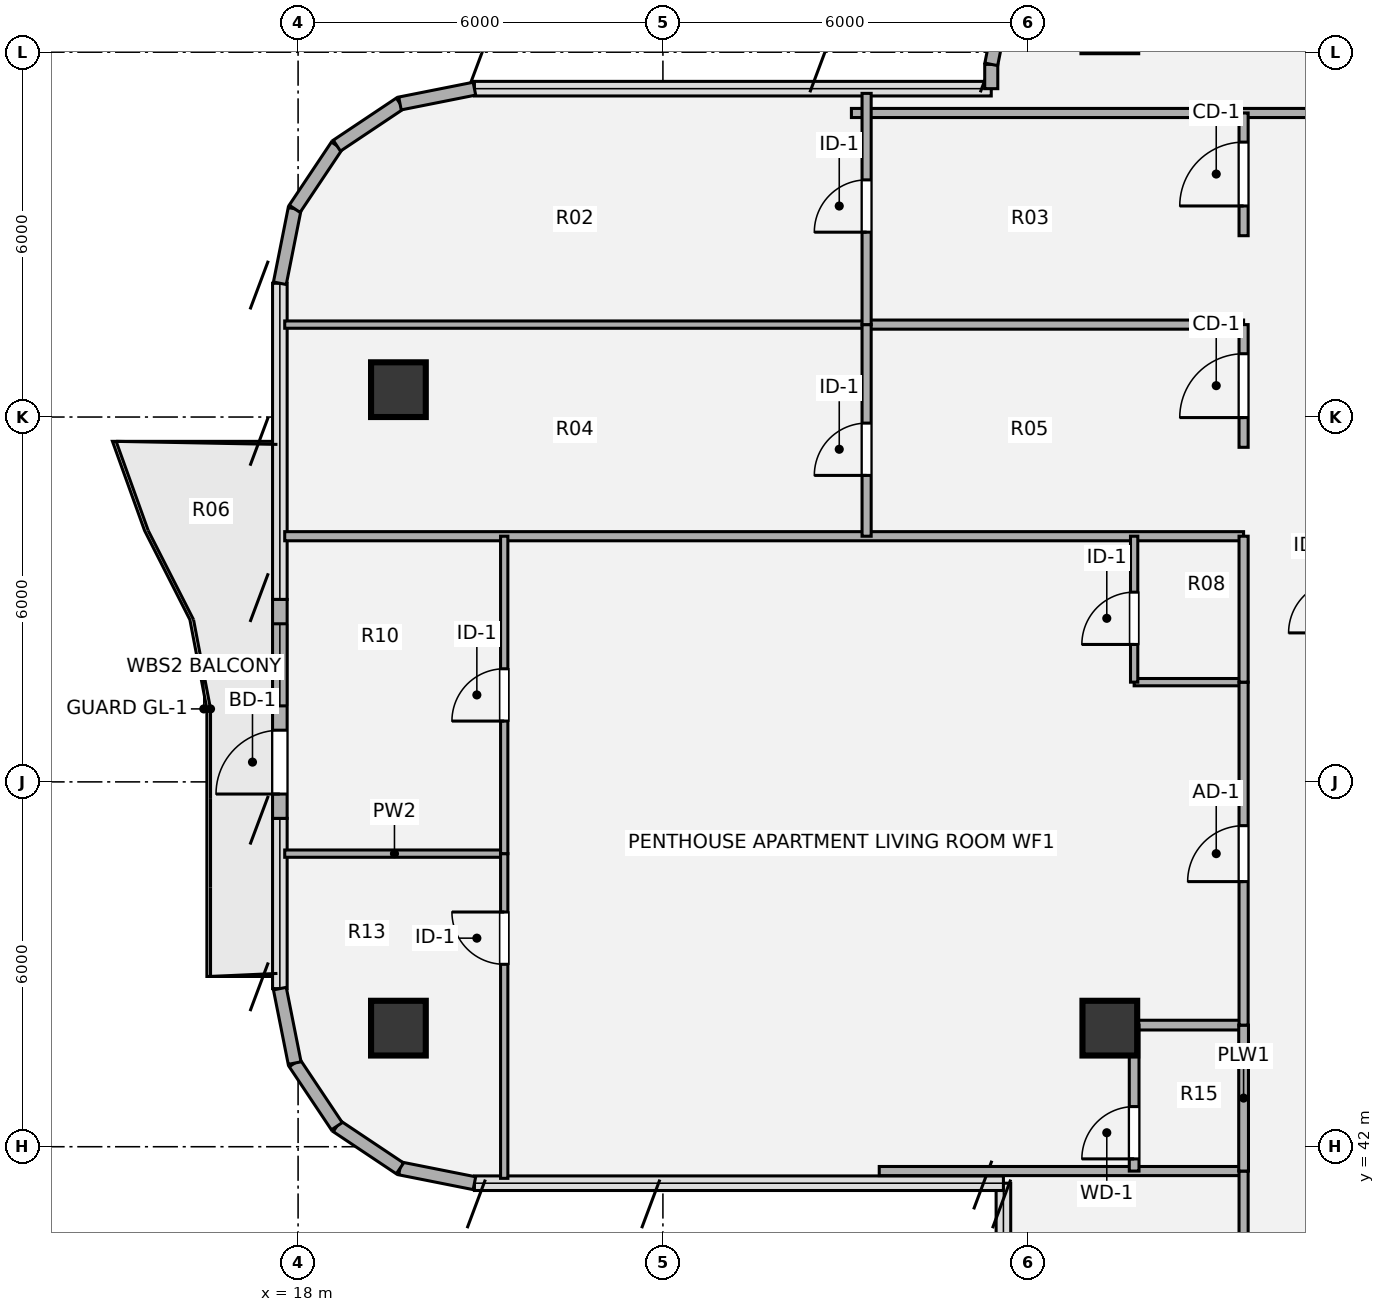
"""IFC4 building model, lengths in metres.
Left out: names, types, materials, properties, quantities, classifications, styles, units other than length and angle.
Written with IfcOpenShell. Run it as: python <this file> out.ifc"""

import sys

from ifc_helpers import new_model, si_unit, direction, frame, frame_2d, origin, origin_2d, place, context, subcontext, project, spatial, rectangle, hollow_circle, extrude, source, transform, mapped, element, fill, save


model = new_model("IFC4")
c1 = context("Model", 3, precision=1e-05, world=origin(), true_north=direction((0.0, 1.0)))
c2 = subcontext(c1, "Body", "Model", "MODEL_VIEW")
j1 = project(units=[si_unit("LENGTHUNIT", "METRE"), si_unit("PLANEANGLEUNIT", "RADIAN")], contexts=[c1])
p1 = place(None, origin())
s1 = spatial("IfcSite", under=j1, at=p1, CompositionType="ELEMENT")
p2 = place(p1, origin())
s2 = spatial("IfcBuilding", under=s1, at=p2, CompositionType="ELEMENT")
p3 = place(p2, frame((0.0, 0.0, 275.94)))
s3 = spatial("IfcBuildingStorey", under=s2, at=p3, CompositionType="ELEMENT", Elevation=275.94)
m1 = source(origin(), c2, "Body", "SweptSolid", [
    extrude(hollow_circle(Radius=0.45, WallThickness=0.032, at=origin_2d()), origin(), (0.0, 0.0, 1.0), 3.78),
])
for number, where, z_axis, x_axis in (
    (1, (19.65, 43.95, 0.0), (0.0, 0.0, 1.0), (1.0, 0.0, 0.0)),
    (2, (19.65, 54.45, 0.0), (0.0, 0.0, 1.0), (1.0, 0.0, 0.0)),
    (3, (31.35, 43.95, 0.0), (0.0, 0.0, 1.0), (1.0, 0.0, 0.0)),
):
    element("IfcColumn", number, at=place(p3, frame(where, z_axis=z_axis, x_axis=x_axis)), inside=s3, PredefinedType="COLUMN", context=c2, shape_type="MappedRepresentation", body=[
        mapped(m1, transform((0.0, 0.0, 0.0), x_axis=(1.0, 0.0, 0.0), y_axis=(0.0, 1.0, 0.0), z_axis=(0.0, 0.0, 1.0), scale=1.0)),
    ])
for number, where, z_axis, x_axis in (
    (4, (20.9, 41.4, 0.0), (0.0, 0.0, 1.0), (-0.981, 0.195, 0.0)),
    (5, (19.675, 41.644, 0.0), (0.0, 0.0, 1.0), (-0.831, 0.556, 0.0)),
    (6, (18.637, 42.337, 0.0), (0.0, 0.0, 1.0), (-0.556, 0.831, 0.0)),
    (7, (17.944, 43.375, 0.0), (0.0, 0.0, 1.0), (-0.195, 0.981, 0.0)),
):
    element("IfcWall", number, at=place(p3, frame(where, z_axis=z_axis, x_axis=x_axis)), inside=s3, PredefinedType="SOLIDWALL", context=c2, shape_type="SweptSolid", body=[
        extrude(rectangle(XDim=1.249, YDim=0.215, at=frame_2d((0.624, 0.0))), origin(), (0.0, 0.0, 1.0), 3.53),
    ])
p4 = place(p3, frame((17.7, 47.4, 0.0), z_axis=(0.0, 0.0, 1.0), x_axis=(0.0, 1.0, 0.0)))
e8 = element("IfcWall", 8, at=p4, inside=s3, PredefinedType="SOLIDWALL", context=c2, shape_type="SweptSolid", body=[
    extrude(rectangle(XDim=3.6, YDim=0.24, at=frame_2d((1.8, 0.0))), origin(), (0.0, 0.0, 1.0), 3.53),
])
p5 = place(p4, frame((0.4, 0.0, 0.0)))
e9 = element("IfcOpeningElement", 9, at=p5, cuts=e8, PredefinedType="OPENING", context=c2, shape_type="SweptSolid", body=[
    extrude(rectangle(XDim=1.05, YDim=2.15, at=origin_2d()), frame((0.525, 0.13, 1.075), z_axis=(0.0, -1.0, 0.0), x_axis=(1.0, 0.0, 0.0)), (0.0, 0.0, 1.0), 0.26),
])
p6 = place(p4, frame((1.85, 0.0, 0.85)))
e10 = element("IfcOpeningElement", 10, at=p6, cuts=e8, PredefinedType="OPENING", context=c2, shape_type="SweptSolid", body=[
    extrude(rectangle(XDim=1.35, YDim=1.35, at=origin_2d()), frame((0.675, 0.13, 0.675), z_axis=(0.0, -1.0, 0.0), x_axis=(1.0, 0.0, 0.0)), (0.0, 0.0, 1.0), 0.26),
])
for number, where, z_axis, x_axis in (
    (11, (17.7, 56.2, 0.0), (0.0, 0.0, 1.0), (0.195, 0.981, 0.0)),
    (12, (17.944, 57.425, 0.0), (0.0, 0.0, 1.0), (0.556, 0.831, 0.0)),
    (13, (18.637, 58.463, 0.0), (0.0, 0.0, 1.0), (0.831, 0.556, 0.0)),
    (14, (19.675, 59.156, 0.0), (0.0, 0.0, 1.0), (0.981, 0.195, 0.0)),
):
    element("IfcWall", number, at=place(p3, frame(where, z_axis=z_axis, x_axis=x_axis)), inside=s3, PredefinedType="SOLIDWALL", context=c2, shape_type="SweptSolid", body=[
        extrude(rectangle(XDim=1.249, YDim=0.215, at=frame_2d((0.624, 0.0))), origin(), (0.0, 0.0, 1.0), 3.53),
    ])
p7 = place(p3, frame((29.4, 59.4, 0.0), z_axis=(0.0, 0.0, 1.0), x_axis=(0.0, 1.0, 0.0)))
e15 = element("IfcWall", 15, at=p7, inside=s3, PredefinedType="SOLIDWALL", context=c2, shape_type="SweptSolid", body=[
    extrude(rectangle(XDim=0.4, YDim=0.215, at=frame_2d((0.2, 0.0))), origin(), (0.0, 0.0, 1.0), 3.53),
])
p8 = place(p3, frame((29.4, 59.8, 0.0), z_axis=(0.0, 0.0, 1.0), x_axis=(0.195190360752, 0.980765376158, 0.0)))
e16 = element("IfcWall", 16, at=p8, inside=s3, PredefinedType="SOLIDWALL", context=c2, shape_type="SweptSolid", body=[
    extrude(rectangle(XDim=1.014, YDim=0.215, at=frame_2d((0.507, 0.0))), origin(), (0.0, 0.0, 1.0), 3.53),
])
p9 = place(p3, frame((27.558, 41.6, 0.0), z_axis=(0.0, 0.0, 1.0), x_axis=(1.0, 0.0, 0.0)))
e17 = element("IfcWall", 17, at=p9, inside=s3, PredefinedType="PARTITIONING", context=c2, shape_type="SweptSolid", body=[
    extrude(rectangle(XDim=5.992, YDim=0.15, at=frame_2d((2.996, 0.0))), origin(), (0.0, 0.0, 1.0), 3.5),
])
p10 = place(p3, frame((31.75, 44.0, 0.0), z_axis=(0.0, 0.0, 1.0), x_axis=(1.0, 0.0, 0.0)))
e18 = element("IfcWall", 18, at=p10, inside=s3, PredefinedType="PLUMBINGWALL", context=c2, shape_type="SweptSolid", body=[
    extrude(rectangle(XDim=1.8, YDim=0.16, at=frame_2d((0.9, 0.0))), origin(), (0.0, 0.0, 1.0), 2.903),
])
p11 = place(p3, frame((17.78, 46.82, 0.0), z_axis=(0.0, 0.0, 1.0), x_axis=(1.0, 0.0, 0.0)))
e19 = element("IfcWall", 19, at=p11, inside=s3, PredefinedType="PARTITIONING", context=c2, shape_type="SweptSolid", body=[
    extrude(rectangle(XDim=3.61, YDim=0.12, at=frame_2d((1.805, 0.0))), origin(), (0.0, 0.0, 1.0), 2.982),
])
p12 = place(p3, frame((31.75, 49.64, 0.0), z_axis=(0.0, 0.0, 1.0), x_axis=(1.0, 0.0, 0.0)))
e20 = element("IfcWall", 20, at=p12, inside=s3, PredefinedType="PARTITIONING", context=c2, shape_type="SweptSolid", body=[
    extrude(rectangle(XDim=1.8, YDim=0.12, at=frame_2d((0.9, 0.0))), origin(), (0.0, 0.0, 1.0), 3.259),
])
p13 = place(p3, frame((17.78, 52.04, 0.0), z_axis=(0.0, 0.0, 1.0), x_axis=(1.0, 0.0, 0.0)))
e21 = element("IfcWall", 21, at=p13, inside=s3, PredefinedType="PARTITIONING", context=c2, shape_type="SweptSolid", body=[
    extrude(rectangle(XDim=15.77, YDim=0.15, at=frame_2d((7.885, 0.0))), origin(), (0.0, 0.0, 1.0), 2.982),
])
p14 = place(p3, frame((17.78, 55.52, 0.0), z_axis=(0.0, 0.0, 1.0), x_axis=(1.0, 0.0, 0.0)))
e22 = element("IfcWall", 22, at=p14, inside=s3, PredefinedType="PARTITIONING", context=c2, shape_type="SweptSolid", body=[
    extrude(rectangle(XDim=9.57, YDim=0.12, at=frame_2d((4.785, 0.0))), origin(), (0.0, 0.0, 1.0), 3.5),
])
p15 = place(p3, frame((27.35, 55.52, 0.0), z_axis=(0.0, 0.0, 1.0), x_axis=(1.0, 0.0, 0.0)))
e23 = element("IfcWall", 23, at=p15, inside=s3, PredefinedType="PARTITIONING", context=c2, shape_type="SweptSolid", body=[
    extrude(rectangle(XDim=6.2, YDim=0.15, at=frame_2d((3.1, 0.0))), origin(), (0.0, 0.0, 1.0), 3.259),
])
p16 = place(p3, frame((27.1, 59.0, 0.0), z_axis=(0.0, 0.0, 1.0), x_axis=(1.0, 0.0, 0.0)))
e24 = element("IfcWall", 24, at=p16, inside=s3, PredefinedType="PARTITIONING", context=c2, shape_type="SweptSolid", body=[
    extrude(rectangle(XDim=17.8, YDim=0.15, at=frame_2d((8.9, 0.0))), origin(), (0.0, 0.0, 1.0), 3.308),
])
p17 = place(p16, frame((8.375, 0.0, 0.0)))
e25 = element("IfcOpeningElement", 25, at=p17, cuts=e24, PredefinedType="OPENING", context=c2, shape_type="SweptSolid", body=[
    extrude(rectangle(XDim=1.05, YDim=2.1, at=origin_2d()), frame((0.525, 0.085, 1.05), z_axis=(0.0, -1.0, 0.0), x_axis=(1.0, 0.0, 0.0)), (0.0, 0.0, 1.0), 0.17),
])
p18 = place(p3, frame((21.39, 41.48, 0.0), z_axis=(0.0, 0.0, 1.0), x_axis=(0.0, 1.0, 0.0)))
e26 = element("IfcWall", 26, at=p18, inside=s3, PredefinedType="PARTITIONING", context=c2, shape_type="SweptSolid", body=[
    extrude(rectangle(XDim=5.34, YDim=0.12, at=frame_2d((2.67, 0.0))), origin(), (0.0, 0.0, 1.0), 3.5),
])
p19 = place(p18, frame((3.52, 0.0, 0.0)))
e27 = element("IfcOpeningElement", 27, at=p19, cuts=e26, PredefinedType="OPENING", context=c2, shape_type="SweptSolid", body=[
    extrude(rectangle(XDim=0.86, YDim=2.1, at=origin_2d()), frame((0.43, 0.07, 1.05), z_axis=(0.0, -1.0, 0.0), x_axis=(1.0, 0.0, 0.0)), (0.0, 0.0, 1.0), 0.14),
])
p20 = place(p3, frame((21.39, 46.82, 0.0), z_axis=(0.0, 0.0, 1.0), x_axis=(0.0, 1.0, 0.0)))
e28 = element("IfcWall", 28, at=p20, inside=s3, PredefinedType="PARTITIONING", context=c2, shape_type="SweptSolid", body=[
    extrude(rectangle(XDim=5.22, YDim=0.12, at=frame_2d((2.61, 0.0))), origin(), (0.0, 0.0, 1.0), 3.5),
])
p21 = place(p20, frame((2.18, 0.0, 0.0)))
e29 = element("IfcOpeningElement", 29, at=p21, cuts=e28, PredefinedType="OPENING", context=c2, shape_type="SweptSolid", body=[
    extrude(rectangle(XDim=0.86, YDim=2.1, at=origin_2d()), frame((0.43, 0.07, 1.05), z_axis=(0.0, -1.0, 0.0), x_axis=(1.0, 0.0, 0.0)), (0.0, 0.0, 1.0), 0.14),
])
p22 = place(p3, frame((27.35, 52.04, 0.0), z_axis=(0.0, 0.0, 1.0), x_axis=(0.0, 1.0, 0.0)))
e30 = element("IfcWall", 30, at=p22, inside=s3, PredefinedType="PARTITIONING", context=c2, shape_type="SweptSolid", body=[
    extrude(rectangle(XDim=3.48, YDim=0.15, at=frame_2d((1.74, 0.0))), origin(), (0.0, 0.0, 1.0), 3.5),
])
p23 = place(p22, frame((1.0, 0.0, 0.0)))
e31 = element("IfcOpeningElement", 31, at=p23, cuts=e30, PredefinedType="OPENING", context=c2, shape_type="SweptSolid", body=[
    extrude(rectangle(XDim=0.86, YDim=2.1, at=origin_2d()), frame((0.43, 0.085, 1.05), z_axis=(0.0, -1.0, 0.0), x_axis=(1.0, 0.0, 0.0)), (0.0, 0.0, 1.0), 0.17),
])
p24 = place(p3, frame((27.35, 55.52, 0.0), z_axis=(0.0, 0.0, 1.0), x_axis=(0.0, 1.0, 0.0)))
e32 = element("IfcWall", 32, at=p24, inside=s3, PredefinedType="PARTITIONING", context=c2, shape_type="SweptSolid", body=[
    extrude(rectangle(XDim=3.802, YDim=0.15, at=frame_2d((1.901, 0.0))), origin(), (0.0, 0.0, 1.0), 3.5),
])
p25 = place(p24, frame((1.52, 0.0, 0.0)))
e33 = element("IfcOpeningElement", 33, at=p25, cuts=e32, PredefinedType="OPENING", context=c2, shape_type="SweptSolid", body=[
    extrude(rectangle(XDim=0.86, YDim=2.1, at=origin_2d()), frame((0.43, 0.085, 1.05), z_axis=(0.0, -1.0, 0.0), x_axis=(1.0, 0.0, 0.0)), (0.0, 0.0, 1.0), 0.17),
])
p26 = place(p3, frame((31.75, 41.6, 0.0), z_axis=(0.0, 0.0, 1.0), x_axis=(0.0, 1.0, 0.0)))
e34 = element("IfcWall", 34, at=p26, inside=s3, PredefinedType="PLUMBINGWALL", context=c2, shape_type="SweptSolid", body=[
    extrude(rectangle(XDim=2.4, YDim=0.16, at=frame_2d((1.2, 0.0))), origin(), (0.0, 0.0, 1.0), 3.5),
])
p27 = place(p26, frame((0.2, 0.0, 0.0)))
e35 = element("IfcOpeningElement", 35, at=p27, cuts=e34, PredefinedType="OPENING", context=c2, shape_type="SweptSolid", body=[
    extrude(rectangle(XDim=0.86, YDim=2.1, at=origin_2d()), frame((0.43, 0.09, 1.05), z_axis=(0.0, -1.0, 0.0), x_axis=(1.0, 0.0, 0.0)), (0.0, 0.0, 1.0), 0.18),
])
p28 = place(p3, frame((31.75, 49.64, 0.0), z_axis=(0.0, 0.0, 1.0), x_axis=(0.0, 1.0, 0.0)))
e36 = element("IfcWall", 36, at=p28, inside=s3, PredefinedType="PARTITIONING", context=c2, shape_type="SweptSolid", body=[
    extrude(rectangle(XDim=2.4, YDim=0.12, at=frame_2d((1.2, 0.0))), origin(), (0.0, 0.0, 1.0), 3.5),
])
p29 = place(p28, frame((0.62, 0.0, 0.0)))
e37 = element("IfcOpeningElement", 37, at=p29, cuts=e36, PredefinedType="OPENING", context=c2, shape_type="SweptSolid", body=[
    extrude(rectangle(XDim=0.86, YDim=2.1, at=origin_2d()), frame((0.43, 0.07, 1.05), z_axis=(0.0, -1.0, 0.0), x_axis=(1.0, 0.0, 0.0)), (0.0, 0.0, 1.0), 0.14),
])
p30 = place(p3, frame((33.55, 22.8, 0.0), z_axis=(0.0, 0.0, 1.0), x_axis=(0.0, 1.0, 0.0)))
e38 = element("IfcWall", 38, at=p30, inside=s3, PredefinedType="PARTITIONING", context=c2, shape_type="SweptSolid", body=[
    extrude(rectangle(XDim=18.8, YDim=0.15, at=frame_2d((9.4, 0.0))), origin(), (0.0, 0.0, 1.0), 3.5),
])
p31 = place(p30, frame((8.84, 0.0, 0.0)))
e39 = element("IfcOpeningElement", 39, at=p31, cuts=e38, PredefinedType="OPENING", context=c2, shape_type="SweptSolid", body=[
    extrude(rectangle(XDim=0.86, YDim=2.1, at=origin_2d()), frame((0.43, 0.085, 1.05), z_axis=(0.0, -1.0, 0.0), x_axis=(1.0, 0.0, 0.0)), (0.0, 0.0, 1.0), 0.17),
])
p32 = place(p3, frame((33.55, 41.6, 0.0), z_axis=(0.0, 0.0, 1.0), x_axis=(0.0, 1.0, 0.0)))
e40 = element("IfcWall", 40, at=p32, inside=s3, PredefinedType="PLUMBINGWALL", context=c2, shape_type="SweptSolid", body=[
    extrude(rectangle(XDim=2.4, YDim=0.16, at=frame_2d((1.2, 0.0))), origin(), (0.0, 0.0, 1.0), 3.5),
])
p33 = place(p3, frame((33.55, 44.0, 0.0), z_axis=(0.0, 0.0, 1.0), x_axis=(0.0, 1.0, 0.0)))
e41 = element("IfcWall", 41, at=p33, inside=s3, PredefinedType="PARTITIONING", context=c2, shape_type="SweptSolid", body=[
    extrude(rectangle(XDim=5.64, YDim=0.15, at=frame_2d((2.82, 0.0))), origin(), (0.0, 0.0, 1.0), 3.5),
])
p34 = place(p33, frame((2.36, 0.0, 0.0)))
e42 = element("IfcOpeningElement", 42, at=p34, cuts=e41, PredefinedType="OPENING", context=c2, shape_type="SweptSolid", body=[
    extrude(rectangle(XDim=0.92, YDim=2.1, at=origin_2d()), frame((0.46, 0.085, 1.05), z_axis=(0.0, -1.0, 0.0), x_axis=(1.0, 0.0, 0.0)), (0.0, 0.0, 1.0), 0.17),
])
p35 = place(p3, frame((33.55, 49.64, 0.0), z_axis=(0.0, 0.0, 1.0), x_axis=(0.0, 1.0, 0.0)))
e43 = element("IfcWall", 43, at=p35, inside=s3, PredefinedType="PARTITIONING", context=c2, shape_type="SweptSolid", body=[
    extrude(rectangle(XDim=2.4, YDim=0.15, at=frame_2d((1.2, 0.0))), origin(), (0.0, 0.0, 1.0), 3.5),
])
p36 = place(p3, frame((33.55, 53.502, 0.0), z_axis=(0.0, 0.0, 1.0), x_axis=(0.0, 1.0, 0.0)))
e44 = element("IfcWall", 44, at=p36, inside=s3, PredefinedType="PARTITIONING", context=c2, shape_type="SweptSolid", body=[
    extrude(rectangle(XDim=2.018, YDim=0.15, at=frame_2d((1.009, 0.0))), origin(), (0.0, 0.0, 1.0), 3.5),
])
p37 = place(p36, frame((0.489, 0.0, 0.0)))
e45 = element("IfcOpeningElement", 45, at=p37, cuts=e44, PredefinedType="OPENING", context=c2, shape_type="SweptSolid", body=[
    extrude(rectangle(XDim=1.05, YDim=2.1, at=origin_2d()), frame((0.525, 0.085, 1.05), z_axis=(0.0, -1.0, 0.0), x_axis=(1.0, 0.0, 0.0)), (0.0, 0.0, 1.0), 0.17),
])
p38 = place(p3, frame((33.55, 56.982, 0.0), z_axis=(0.0, 0.0, 1.0), x_axis=(0.0, 1.0, 0.0)))
e46 = element("IfcWall", 46, at=p38, inside=s3, PredefinedType="PARTITIONING", context=c2, shape_type="SweptSolid", body=[
    extrude(rectangle(XDim=2.018, YDim=0.15, at=frame_2d((1.009, 0.0))), origin(), (0.0, 0.0, 1.0), 3.5),
])
p39 = place(p38, frame((0.489, 0.0, 0.0)))
e47 = element("IfcOpeningElement", 47, at=p39, cuts=e46, PredefinedType="OPENING", context=c2, shape_type="SweptSolid", body=[
    extrude(rectangle(XDim=1.05, YDim=2.1, at=origin_2d()), frame((0.525, 0.085, 1.05), z_axis=(0.0, -1.0, 0.0), x_axis=(1.0, 0.0, 0.0)), (0.0, 0.0, 1.0), 0.17),
])
m2 = source(origin(), c2, "Body", "SweptSolid", [
    extrude(rectangle(XDim=1.05, YDim=2.15, at=origin_2d()), frame((0.525, 0.025, 1.075), z_axis=(0.0, -1.0, 0.0), x_axis=(1.0, 0.0, 0.0)), (0.0, 0.0, 1.0), 0.05),
])
p40 = place(p5, origin())
e48 = element("IfcDoor", 48, at=p40, inside=s3, OperationType="SINGLE_SWING_LEFT", PredefinedType="DOOR", context=c2, shape_type="MappedRepresentation", body=[
    mapped(m2, transform((0.0, 0.0, 0.0), x_axis=(1.0, 0.0, 0.0), y_axis=(0.0, 1.0, 0.0), z_axis=(0.0, 0.0, 1.0), scale=1.0)),
])
fill(e9, e48)
m3 = source(origin(), c2, "Body", "SweptSolid", [
    extrude(rectangle(XDim=1.35, YDim=1.35, at=origin_2d()), frame((0.675, 0.03, 0.675), z_axis=(0.0, -1.0, 0.0), x_axis=(1.0, 0.0, 0.0)), (0.0, 0.0, 1.0), 0.06),
])
p41 = place(p6, origin())
e49 = element("IfcWindow", 49, at=p41, inside=s3, PartitioningType="SINGLE_PANEL", PredefinedType="WINDOW", context=c2, shape_type="MappedRepresentation", body=[
    mapped(m3, transform((0.0, 0.0, 0.0), x_axis=(1.0, 0.0, 0.0), y_axis=(0.0, 1.0, 0.0), z_axis=(0.0, 0.0, 1.0), scale=1.0)),
])
fill(e10, e49)
m4 = source(origin(), c2, "Body", "SweptSolid", [
    extrude(rectangle(XDim=0.86, YDim=2.1, at=origin_2d()), frame((0.43, 0.025, 1.05), z_axis=(0.0, -1.0, 0.0), x_axis=(1.0, 0.0, 0.0)), (0.0, 0.0, 1.0), 0.05),
])
p42 = place(p19, origin())
e50 = element("IfcDoor", 50, at=p42, inside=s3, OperationType="SINGLE_SWING_RIGHT", PredefinedType="DOOR", context=c2, shape_type="MappedRepresentation", body=[
    mapped(m4, transform((0.0, 0.0, 0.0), x_axis=(1.0, 0.0, 0.0), y_axis=(0.0, 1.0, 0.0), z_axis=(0.0, 0.0, 1.0), scale=1.0)),
])
fill(e27, e50)
p43 = place(p21, origin())
e51 = element("IfcDoor", 51, at=p43, inside=s3, OperationType="SINGLE_SWING_LEFT", PredefinedType="DOOR", context=c2, shape_type="MappedRepresentation", body=[
    mapped(m4, transform((0.0, 0.0, 0.0), x_axis=(1.0, 0.0, 0.0), y_axis=(0.0, 1.0, 0.0), z_axis=(0.0, 0.0, 1.0), scale=1.0)),
])
fill(e29, e51)
p44 = place(p23, origin())
e52 = element("IfcDoor", 52, at=p44, inside=s3, OperationType="SINGLE_SWING_LEFT", PredefinedType="DOOR", context=c2, shape_type="MappedRepresentation", body=[
    mapped(m4, transform((0.0, 0.0, 0.0), x_axis=(1.0, 0.0, 0.0), y_axis=(0.0, 1.0, 0.0), z_axis=(0.0, 0.0, 1.0), scale=1.0)),
])
fill(e31, e52)
p45 = place(p25, origin())
e53 = element("IfcDoor", 53, at=p45, inside=s3, OperationType="SINGLE_SWING_LEFT", PredefinedType="DOOR", context=c2, shape_type="MappedRepresentation", body=[
    mapped(m4, transform((0.0, 0.0, 0.0), x_axis=(1.0, 0.0, 0.0), y_axis=(0.0, 1.0, 0.0), z_axis=(0.0, 0.0, 1.0), scale=1.0)),
])
fill(e33, e53)
m5 = source(origin(), c2, "Body", "SweptSolid", [
    extrude(rectangle(XDim=0.86, YDim=2.1, at=origin_2d()), frame((0.43, 0.025, 1.05), z_axis=(0.0, -1.0, 0.0), x_axis=(1.0, 0.0, 0.0)), (0.0, 0.0, 1.0), 0.05),
])
p46 = place(p27, origin())
e54 = element("IfcDoor", 54, at=p46, inside=s3, OperationType="SINGLE_SWING_LEFT", PredefinedType="DOOR", context=c2, shape_type="MappedRepresentation", body=[
    mapped(m5, transform((0.0, 0.0, 0.0), x_axis=(1.0, 0.0, 0.0), y_axis=(0.0, 1.0, 0.0), z_axis=(0.0, 0.0, 1.0), scale=1.0)),
])
fill(e35, e54)
p47 = place(p29, origin())
e55 = element("IfcDoor", 55, at=p47, inside=s3, OperationType="SINGLE_SWING_LEFT", PredefinedType="DOOR", context=c2, shape_type="MappedRepresentation", body=[
    mapped(m4, transform((0.0, 0.0, 0.0), x_axis=(1.0, 0.0, 0.0), y_axis=(0.0, 1.0, 0.0), z_axis=(0.0, 0.0, 1.0), scale=1.0)),
])
fill(e37, e55)
m6 = source(origin(), c2, "Body", "SweptSolid", [
    extrude(rectangle(XDim=0.92, YDim=2.1, at=origin_2d()), frame((0.46, 0.025, 1.05), z_axis=(0.0, -1.0, 0.0), x_axis=(1.0, 0.0, 0.0)), (0.0, 0.0, 1.0), 0.05),
])
p48 = place(p34, origin())
e56 = element("IfcDoor", 56, at=p48, inside=s3, OperationType="SINGLE_SWING_LEFT", PredefinedType="DOOR", context=c2, shape_type="MappedRepresentation", body=[
    mapped(m6, transform((0.0, 0.0, 0.0), x_axis=(1.0, 0.0, 0.0), y_axis=(0.0, 1.0, 0.0), z_axis=(0.0, 0.0, 1.0), scale=1.0)),
])
fill(e42, e56)
m7 = source(origin(), c2, "Body", "SweptSolid", [
    extrude(rectangle(XDim=1.05, YDim=2.1, at=origin_2d()), frame((0.525, 0.025, 1.05), z_axis=(0.0, -1.0, 0.0), x_axis=(1.0, 0.0, 0.0)), (0.0, 0.0, 1.0), 0.05),
])
p49 = place(p37, origin())
e57 = element("IfcDoor", 57, at=p49, inside=s3, OperationType="SINGLE_SWING_LEFT", PredefinedType="DOOR", context=c2, shape_type="MappedRepresentation", body=[
    mapped(m7, transform((0.0, 0.0, 0.0), x_axis=(1.0, 0.0, 0.0), y_axis=(0.0, 1.0, 0.0), z_axis=(0.0, 0.0, 1.0), scale=1.0)),
])
fill(e45, e57)
p50 = place(p39, origin())
e58 = element("IfcDoor", 58, at=p50, inside=s3, OperationType="SINGLE_SWING_LEFT", PredefinedType="DOOR", context=c2, shape_type="MappedRepresentation", body=[
    mapped(m7, transform((0.0, 0.0, 0.0), x_axis=(1.0, 0.0, 0.0), y_axis=(0.0, 1.0, 0.0), z_axis=(0.0, 0.0, 1.0), scale=1.0)),
])
fill(e47, e58)
save(model, sys.argv[1])
